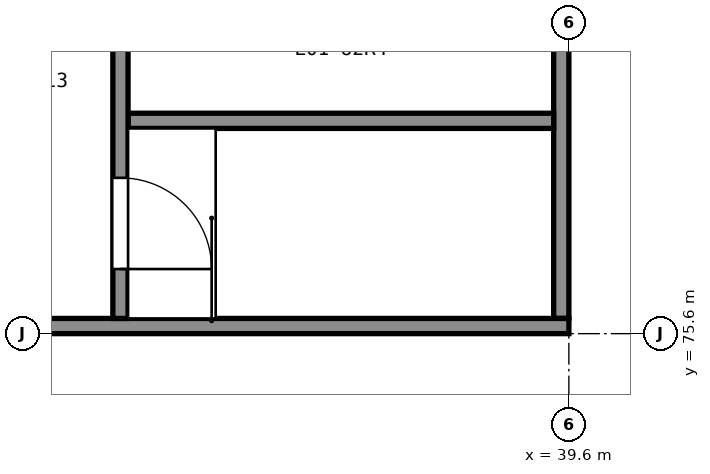
"""IFC4 building model, lengths in metres.
Left out: names, types, materials, properties, quantities, classifications, styles, units other than length and angle.
Written with IfcOpenShell. Run it as: python <this file> out.ifc"""

import sys

from ifc_helpers import new_model, si_unit, direction, frame, frame_2d, origin, place, context, subcontext, project, spatial, polyline, rectangle, outline, extrude, element, fill, save


model = new_model("IFC4")
c1 = context("Model", 3, precision=1e-05, world=origin(), true_north=direction((0.0, 1.0)))
c2 = subcontext(c1, "Body", "Model", "MODEL_VIEW")
j1 = project(units=[si_unit("LENGTHUNIT", "METRE"), si_unit("PLANEANGLEUNIT", "RADIAN")], contexts=[c1])
p1 = place(None, origin())
s1 = spatial("IfcSite", under=j1, at=p1, CompositionType="ELEMENT")
p2 = place(p1, origin())
s2 = spatial("IfcBuilding", under=s1, at=p2, CompositionType="ELEMENT")
p3 = place(p2, frame((0.0, 0.0, 5.5)))
s3 = spatial("IfcBuildingStorey", under=s2, at=p3, CompositionType="ELEMENT", Elevation=5.5)
p4 = place(p3, frame((31.2, 75.7, 0.0), z_axis=(0.0, 0.0, 1.0), x_axis=(1.0, 0.0, 0.0)))
e1 = element("IfcWall", 1, at=p4, inside=s3, PredefinedType="SHEAR", context=c2, shape_type="SweptSolid", body=[
    extrude(rectangle(XDim=8.4, YDim=0.2, at=frame_2d((4.2, 0.0))), origin(), (0.0, 0.0, 1.0), 5.625),
])
p5 = place(p3, frame((39.5, 75.8, 0.0), z_axis=(0.0, 0.0, 1.0), x_axis=(0.0, 1.0, 0.0)))
e2 = element("IfcWall", 2, at=p5, inside=s3, PredefinedType="SHEAR", context=c2, shape_type="SweptSolid", body=[
    extrude(outline(polyline([(0.0, 0.0), (8.0, 0.0), (8.0, 7.674), (7.407, 7.524), (7.111, 7.45), (0.889, 5.875), (0.593, 5.801), (0.0, 5.651), (0.0, 0.0)])), frame((0.0, 0.1, 0.0), z_axis=(0.0, -1.0, 0.0), x_axis=(1.0, 0.0, 0.0)), (0.0, 0.0, 1.0), 0.2),
])
p6 = place(p3, frame((33.7, 75.8, 0.0), z_axis=(0.0, 0.0, 1.0), x_axis=(0.0, 1.0, 0.0)))
e3 = element("IfcWall", 3, at=p6, inside=s3, PredefinedType="SHEAR", context=c2, shape_type="SweptSolid", body=[
    extrude(outline(polyline([(0.0, 0.0), (8.0, 0.0), (8.0, 7.674), (7.407, 7.524), (7.111, 7.45), (0.889, 5.875), (0.593, 5.801), (0.0, 5.651), (0.0, 0.0)])), frame((0.0, 0.1, 0.0), z_axis=(0.0, -1.0, 0.0), x_axis=(1.0, 0.0, 0.0)), (0.0, 0.0, 1.0), 0.2),
])
p7 = place(p6, frame((0.65, 0.0, 0.0)))
e4 = element("IfcOpeningElement", 4, at=p7, cuts=e3, PredefinedType="OPENING", context=c2, shape_type="SweptSolid", body=[
    extrude(rectangle(XDim=1.2, YDim=2.1, at=frame_2d((0.6, 1.05))), frame((0.0, 0.11, 0.0), z_axis=(0.0, -1.0, 0.0), x_axis=(1.0, 0.0, 0.0)), (0.0, 0.0, 1.0), 0.22),
])
p8 = place(p6, frame((6.15, 0.0, 0.0)))
e5 = element("IfcOpeningElement", 5, at=p8, cuts=e3, PredefinedType="OPENING", context=c2, shape_type="SweptSolid", body=[
    extrude(rectangle(XDim=1.2, YDim=2.1, at=frame_2d((0.6, 1.05))), frame((0.0, 0.11, 0.0), z_axis=(0.0, -1.0, 0.0), x_axis=(1.0, 0.0, 0.0)), (0.0, 0.0, 1.0), 0.22),
])
p9 = place(p3, frame((33.8, 78.4, 0.0), z_axis=(0.0, 0.0, 1.0), x_axis=(1.0, 0.0, 0.0)))
e6 = element("IfcWall", 6, at=p9, inside=s3, PredefinedType="SHEAR", context=c2, shape_type="SweptSolid", body=[
    extrude(rectangle(XDim=5.6, YDim=0.2, at=frame_2d((2.8, 0.0))), origin(), (0.0, 0.0, 1.0), 6.308),
])
p10 = place(p7, origin())
e7 = element("IfcDoor", 7, at=p10, inside=s3, OperationType="SINGLE_SWING_LEFT", PredefinedType="DOOR", context=c2, shape_type="SweptSolid", body=[
    extrude(rectangle(XDim=1.2, YDim=2.1, at=frame_2d((0.6, 1.05))), frame((0.0, 0.025, 0.0), z_axis=(0.0, -1.0, 0.0), x_axis=(1.0, 0.0, 0.0)), (0.0, 0.0, 1.0), 0.05),
])
fill(e4, e7)
save(model, sys.argv[1])
